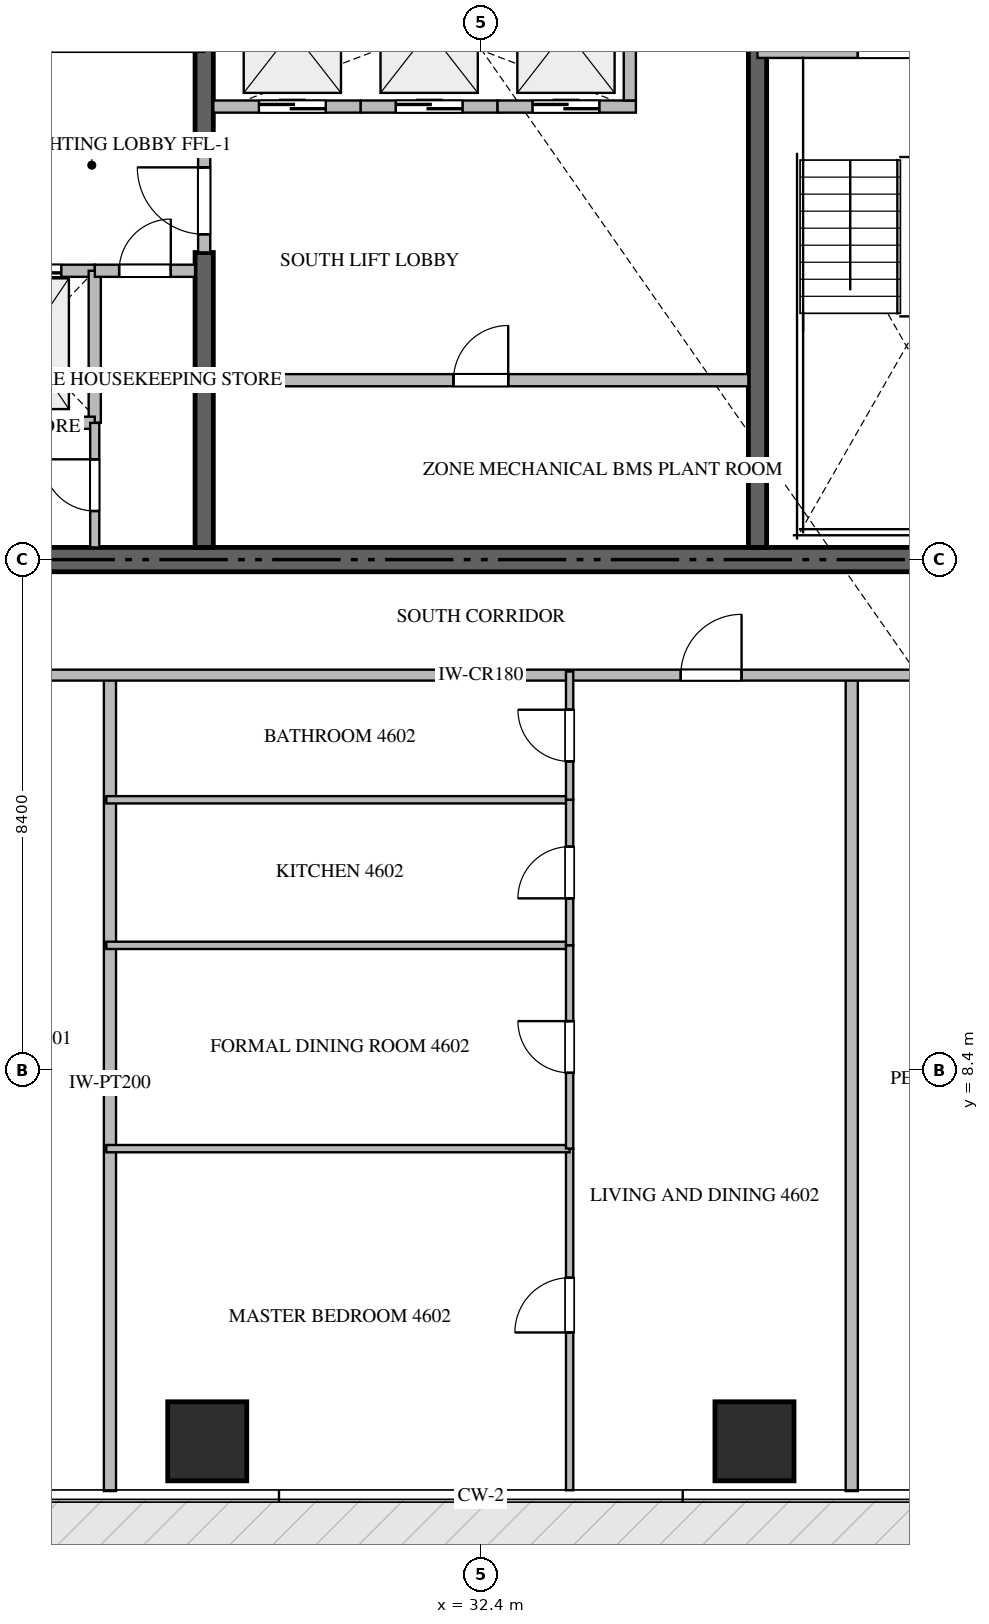
"""IFC4 building model, lengths in metres.
Left out: names, types, materials, properties, quantities, classifications, styles, units other than length and angle.
Written with IfcOpenShell. Run it as: python <this file> out.ifc"""

import sys

from ifc_helpers import new_model, si_unit, direction, frame, frame_2d, origin, origin_2d, place, context, subcontext, project, spatial, rectangle, extrude, source, transform, mapped, element, fill, save


model = new_model("IFC4")
c1 = context("Model", 3, precision=1e-05, world=origin(), true_north=direction((0.0, 1.0)))
c2 = subcontext(c1, "Body", "Model", "MODEL_VIEW")
j1 = project(units=[si_unit("LENGTHUNIT", "METRE"), si_unit("PLANEANGLEUNIT", "RADIAN")], contexts=[c1])
p1 = place(None, origin())
s1 = spatial("IfcSite", under=j1, at=p1, CompositionType="ELEMENT")
p2 = place(p1, origin())
s2 = spatial("IfcBuilding", under=s1, at=p2, CompositionType="ELEMENT")
p3 = place(p2, frame((0.0, 0.0, 183.9)))
s3 = spatial("IfcBuildingStorey", under=s2, at=p3, CompositionType="ELEMENT", Elevation=183.9)
p4 = place(p3, frame((23.4, 16.8, -0.26), z_axis=(0.0, 0.0, 1.0), x_axis=(1.0, 0.0, 0.0)))
e1 = element("IfcWall", 1, at=p4, inside=s3, PredefinedType="SHEAR", context=c2, shape_type="SweptSolid", body=[
    extrude(rectangle(XDim=18.0, YDim=0.4, at=frame_2d((9.0, 0.0))), origin(), (0.0, 0.0, 1.0), 3.748),
])
p5 = place(p3, frame((27.85, 17.0, -0.26), z_axis=(0.0, 0.0, 1.0), x_axis=(0.0, 1.0, 0.0)))
e2 = element("IfcWall", 2, at=p5, inside=s3, PredefinedType="SHEAR", context=c2, shape_type="SweptSolid", body=[
    extrude(rectangle(XDim=4.85, YDim=0.3, at=frame_2d((2.425, 0.0))), origin(), (0.0, 0.0, 1.0), 3.748),
])
p6 = place(p3, frame((27.85, 23.55, -0.26), z_axis=(0.0, 0.0, 1.0), x_axis=(0.0, 1.0, 0.0)))
e3 = element("IfcWall", 3, at=p6, inside=s3, PredefinedType="SHEAR", context=c2, shape_type="SweptSolid", body=[
    extrude(rectangle(XDim=9.85, YDim=0.3, at=frame_2d((4.925, 0.0))), origin(), (0.0, 0.0, 1.0), 3.748),
])
p7 = place(p3, frame((36.95, 17.0, -0.26), z_axis=(0.0, 0.0, 1.0), x_axis=(0.0, 1.0, 0.0)))
e4 = element("IfcWall", 4, at=p7, inside=s3, PredefinedType="SHEAR", context=c2, shape_type="SweptSolid", body=[
    extrude(rectangle(XDim=8.35, YDim=0.3, at=frame_2d((4.175, 0.0))), origin(), (0.0, 0.0, 1.0), 3.748),
])
m1 = source(origin(), c2, "Body", "SweptSolid", [
    extrude(rectangle(XDim=1.3, YDim=1.3, at=origin_2d()), origin(), (0.0, 0.0, 1.0), 3.75),
])
for number, where, z_axis, x_axis in (
    (5, (27.9, 2.3, -0.26), (0.0, 0.0, 1.0), (1.0, 0.0, 0.0)),
    (6, (36.9, 2.3, -0.26), (0.0, 0.0, 1.0), (1.0, 0.0, 0.0)),
):
    element("IfcColumn", number, at=place(p3, frame(where, z_axis=z_axis, x_axis=x_axis)), inside=s3, PredefinedType="COLUMN", context=c2, shape_type="MappedRepresentation", body=[
        mapped(m1, transform((0.0, 0.0, 0.0), scale=1.0)),
    ])
p8 = place(p3, frame((36.95, 25.15, 0.0), z_axis=(0.0, 0.0, 1.0), x_axis=(1.0, 0.0, 0.0)))
e7 = element("IfcWall", 7, at=p8, inside=s3, PredefinedType="STANDARD", context=c2, shape_type="SweptSolid", body=[
    extrude(rectangle(XDim=4.45, YDim=0.2, at=frame_2d((2.225, 0.0))), origin(), (0.0, 0.0, 1.0), 3.49),
])
p9 = place(p8, frame((1.65, 0.0, 0.0)))
e8 = element("IfcOpeningElement", 8, at=p9, cuts=e7, PredefinedType="OPENING", context=c2, shape_type="SweptSolid", body=[
    extrude(rectangle(XDim=1.1, YDim=2.15, at=frame_2d((0.55, 1.075))), frame((0.0, 0.11, 0.0), z_axis=(0.0, -1.0, 0.0), x_axis=(1.0, 0.0, 0.0)), (0.0, 0.0, 1.0), 0.22),
])
p10 = place(p3, frame((23.6, 21.55, 0.0), z_axis=(0.0, 0.0, 1.0), x_axis=(1.0, 0.0, 0.0)))
e9 = element("IfcWall", 9, at=p10, inside=s3, PredefinedType="STANDARD", context=c2, shape_type="SweptSolid", body=[
    extrude(rectangle(XDim=2.45, YDim=0.2, at=frame_2d((1.225, 0.0))), origin(), (0.0, 0.0, 1.0), 3.49),
])
p11 = place(p10, frame((0.7, 0.0, 0.0)))
e10 = element("IfcOpeningElement", 10, at=p11, cuts=e9, PredefinedType="OPENING", context=c2, shape_type="SweptSolid", body=[
    extrude(rectangle(XDim=1.2, YDim=2.2, at=frame_2d((0.6, 1.1))), frame((0.0, 0.11, 0.0), z_axis=(0.0, -1.0, 0.0), x_axis=(1.0, 0.0, 0.0)), (0.0, 0.0, 1.0), 0.22),
])
p12 = place(p3, frame((28.0, 24.25, 0.0), z_axis=(0.0, 0.0, 1.0), x_axis=(1.0, 0.0, 0.0)))
e11 = element("IfcWall", 11, at=p12, inside=s3, PredefinedType="STANDARD", context=c2, shape_type="SweptSolid", body=[
    extrude(rectangle(XDim=2.425, YDim=0.2, at=frame_2d((1.212, 0.0))), origin(), (0.0, 0.0, 1.0), 3.49),
])
p13 = place(p12, frame((0.75, 0.0, 0.0)))
e12 = element("IfcOpeningElement", 12, at=p13, cuts=e11, PredefinedType="OPENING", context=c2, shape_type="SweptSolid", body=[
    extrude(rectangle(XDim=1.1, YDim=2.2, at=frame_2d((0.55, 1.1))), frame((0.0, 0.11, 0.0), z_axis=(0.0, -1.0, 0.0), x_axis=(1.0, 0.0, 0.0)), (0.0, 0.0, 1.0), 0.22),
])
p14 = place(p3, frame((30.425, 24.25, 0.0), z_axis=(0.0, 0.0, 1.0), x_axis=(1.0, 0.0, 0.0)))
e13 = element("IfcWall", 13, at=p14, inside=s3, PredefinedType="STANDARD", context=c2, shape_type="SweptSolid", body=[
    extrude(rectangle(XDim=2.25, YDim=0.2, at=frame_2d((1.125, 0.0))), origin(), (0.0, 0.0, 1.0), 3.49),
])
p15 = place(p14, frame((0.575, 0.0, 0.0)))
e14 = element("IfcOpeningElement", 14, at=p15, cuts=e13, PredefinedType="OPENING", context=c2, shape_type="SweptSolid", body=[
    extrude(rectangle(XDim=1.1, YDim=2.2, at=frame_2d((0.55, 1.1))), frame((0.0, 0.11, 0.0), z_axis=(0.0, -1.0, 0.0), x_axis=(1.0, 0.0, 0.0)), (0.0, 0.0, 1.0), 0.22),
])
p16 = place(p3, frame((32.675, 24.25, 0.0), z_axis=(0.0, 0.0, 1.0), x_axis=(1.0, 0.0, 0.0)))
e15 = element("IfcWall", 15, at=p16, inside=s3, PredefinedType="STANDARD", context=c2, shape_type="SweptSolid", body=[
    extrude(rectangle(XDim=2.275, YDim=0.2, at=frame_2d((1.137, 0.0))), origin(), (0.0, 0.0, 1.0), 3.49),
])
p17 = place(p16, frame((0.575, 0.0, 0.0)))
e16 = element("IfcOpeningElement", 16, at=p17, cuts=e15, PredefinedType="OPENING", context=c2, shape_type="SweptSolid", body=[
    extrude(rectangle(XDim=1.1, YDim=2.2, at=frame_2d((0.55, 1.1))), frame((0.0, 0.11, 0.0), z_axis=(0.0, -1.0, 0.0), x_axis=(1.0, 0.0, 0.0)), (0.0, 0.0, 1.0), 0.22),
])
for number, where, z_axis, x_axis in (
    (17, (34.85, 24.35, 0.0), (0.0, 0.0, 1.0), (0.0, 1.0, 0.0)),
    (18, (26.05, 19.05, 0.0), (0.0, 0.0, 1.0), (0.0, 1.0, 0.0)),
):
    element("IfcWall", number, at=place(p3, frame(where, z_axis=z_axis, x_axis=x_axis)), inside=s3, PredefinedType="STANDARD", context=c2, shape_type="SweptSolid", body=[
        extrude(rectangle(XDim=2.5, YDim=0.2, at=frame_2d((1.25, 0.0))), origin(), (0.0, 0.0, 1.0), 3.49),
    ])
p18 = place(p3, frame((23.6, 19.05, 0.0), z_axis=(0.0, 0.0, 1.0), x_axis=(1.0, 0.0, 0.0)))
e19 = element("IfcWall", 19, at=p18, inside=s3, PredefinedType="STANDARD", context=c2, shape_type="SweptSolid", body=[
    extrude(rectangle(XDim=2.45, YDim=0.2, at=frame_2d((1.225, 0.0))), origin(), (0.0, 0.0, 1.0), 3.49),
])
p19 = place(p3, frame((26.052, 21.55, 0.0), z_axis=(0.0, 0.0, 1.0), x_axis=(1.0, 0.0, 0.0)))
e20 = element("IfcWall", 20, at=p19, inside=s3, PredefinedType="STANDARD", context=c2, shape_type="SweptSolid", body=[
    extrude(rectangle(XDim=1.648, YDim=0.2, at=frame_2d((0.824, 0.0))), origin(), (0.0, 0.0, 1.0), 3.49),
])
p20 = place(p19, frame((0.399, 0.0, 0.0)))
e21 = element("IfcOpeningElement", 21, at=p20, cuts=e20, PredefinedType="OPENING", context=c2, shape_type="SweptSolid", body=[
    extrude(rectangle(XDim=0.85, YDim=2.1, at=frame_2d((0.425, 1.05))), frame((0.0, 0.11, 0.0), z_axis=(0.0, -1.0, 0.0), x_axis=(1.0, 0.0, 0.0)), (0.0, 0.0, 1.0), 0.22),
])
p21 = place(p3, frame((27.85, 21.852, 0.0), z_axis=(0.0, 0.0, 1.0), x_axis=(0.0, 1.0, 0.0)))
e22 = element("IfcWall", 22, at=p21, inside=s3, PredefinedType="STANDARD", context=c2, shape_type="SweptSolid", body=[
    extrude(rectangle(XDim=1.696, YDim=0.2, at=frame_2d((0.848, 0.0))), origin(), (0.0, 0.0, 1.0), 3.49),
])
p22 = place(p21, frame((0.298, 0.0, 0.0)))
e23 = element("IfcOpeningElement", 23, at=p22, cuts=e22, PredefinedType="OPENING", context=c2, shape_type="SweptSolid", body=[
    extrude(rectangle(XDim=1.1, YDim=2.15, at=frame_2d((0.55, 1.075))), frame((0.0, 0.11, 0.0), z_axis=(0.0, -1.0, 0.0), x_axis=(1.0, 0.0, 0.0)), (0.0, 0.0, 1.0), 0.22),
])
p23 = place(p3, frame((26.05, 17.0, 0.0), z_axis=(0.0, 0.0, 1.0), x_axis=(0.0, 1.0, 0.0)))
e24 = element("IfcWall", 24, at=p23, inside=s3, PredefinedType="PARTITIONING", context=c2, shape_type="SweptSolid", body=[
    extrude(rectangle(XDim=2.048, YDim=0.15, at=frame_2d((1.024, 0.0))), origin(), (0.0, 0.0, 1.0), 3.49),
])
p24 = place(p23, frame((0.599, 0.0, 0.0)))
e25 = element("IfcOpeningElement", 25, at=p24, cuts=e24, PredefinedType="OPENING", context=c2, shape_type="SweptSolid", body=[
    extrude(rectangle(XDim=0.85, YDim=2.1, at=frame_2d((0.425, 1.05))), frame((0.0, 0.085, 0.0), z_axis=(0.0, -1.0, 0.0), x_axis=(1.0, 0.0, 0.0)), (0.0, 0.0, 1.0), 0.17),
])
p25 = place(p3, frame((28.0, 19.75, 0.0), z_axis=(0.0, 0.0, 1.0), x_axis=(1.0, 0.0, 0.0)))
e26 = element("IfcWall", 26, at=p25, inside=s3, PredefinedType="STANDARD", context=c2, shape_type="SweptSolid", body=[
    extrude(rectangle(XDim=8.8, YDim=0.2, at=frame_2d((4.4, 0.0))), origin(), (0.0, 0.0, 1.0), 3.49),
])
p26 = place(p25, frame((3.95, 0.0, 0.0)))
e27 = element("IfcOpeningElement", 27, at=p26, cuts=e26, PredefinedType="OPENING", context=c2, shape_type="SweptSolid", body=[
    extrude(rectangle(XDim=0.9, YDim=2.1, at=frame_2d((0.45, 1.05))), frame((0.0, 0.11, 0.0), z_axis=(0.0, -1.0, 0.0), x_axis=(1.0, 0.0, 0.0)), (0.0, 0.0, 1.0), 0.22),
])
for number, where, z_axis, x_axis in (
    (28, (26.3, 1.482, 0.0), (0.0, 0.0, 1.0), (0.0, 1.0, 0.0)),
    (29, (38.5, 1.482, 0.0), (0.0, 0.0, 1.0), (0.0, 1.0, 0.0)),
):
    element("IfcWall", number, at=place(p3, frame(where, z_axis=z_axis, x_axis=x_axis)), inside=s3, PredefinedType="PARTITIONING", context=c2, shape_type="SweptSolid", body=[
        extrude(rectangle(XDim=13.418, YDim=0.2, at=frame_2d((6.709, 0.0))), origin(), (0.0, 0.0, 1.0), 3.49),
    ])
p27 = place(p3, frame((20.952, 14.9, 0.0), z_axis=(0.0, 0.0, 1.0), x_axis=(1.0, 0.0, 0.0)))
e30 = element("IfcWall", 30, at=p27, inside=s3, PredefinedType="PARTITIONING", context=c2, shape_type="SweptSolid", body=[
    extrude(rectangle(XDim=22.896, YDim=0.18, at=frame_2d((11.448, 0.0))), origin(), (0.0, 0.0, 1.0), 3.49),
])
p28 = place(p27, frame((2.781, 0.0, 0.0)))
e31 = element("IfcOpeningElement", 31, at=p28, cuts=e30, PredefinedType="OPENING", context=c2, shape_type="SweptSolid", body=[
    extrude(rectangle(XDim=1.0, YDim=2.15, at=frame_2d((0.5, 1.075))), frame((0.0, 0.1, 0.0), z_axis=(0.0, -1.0, 0.0), x_axis=(1.0, 0.0, 0.0)), (0.0, 0.0, 1.0), 0.2),
])
p29 = place(p27, frame((14.736, 0.0, 0.0)))
e32 = element("IfcOpeningElement", 32, at=p29, cuts=e30, PredefinedType="OPENING", context=c2, shape_type="SweptSolid", body=[
    extrude(rectangle(XDim=1.0, YDim=2.15, at=frame_2d((0.5, 1.075))), frame((0.0, 0.1, 0.0), z_axis=(0.0, -1.0, 0.0), x_axis=(1.0, 0.0, 0.0)), (0.0, 0.0, 1.0), 0.2),
])
p30 = place(p27, frame((19.115, 0.0, 0.0)))
e33 = element("IfcOpeningElement", 33, at=p30, cuts=e30, PredefinedType="OPENING", context=c2, shape_type="SweptSolid", body=[
    extrude(rectangle(XDim=1.0, YDim=2.15, at=frame_2d((0.5, 1.075))), frame((0.0, 0.1, 0.0), z_axis=(0.0, -1.0, 0.0), x_axis=(1.0, 0.0, 0.0)), (0.0, 0.0, 1.0), 0.2),
])
p31 = place(p3, frame((33.86, 1.495, 0.0), z_axis=(0.0, 0.0, 1.0), x_axis=(0.0, 1.0, 0.0)))
e34 = element("IfcWall", 34, at=p31, inside=s3, PredefinedType="PARTITIONING", context=c2, shape_type="SweptSolid", body=[
    extrude(rectangle(XDim=5.618, YDim=0.12, at=frame_2d((2.809, 0.0))), origin(), (0.0, 0.0, 1.0), 3.49),
])
p32 = place(p31, frame((2.595, 0.0, 0.0)))
e35 = element("IfcOpeningElement", 35, at=p32, cuts=e34, PredefinedType="OPENING", context=c2, shape_type="SweptSolid", body=[
    extrude(rectangle(XDim=0.9, YDim=2.1, at=frame_2d((0.45, 1.05))), frame((0.0, 0.07, 0.0), z_axis=(0.0, -1.0, 0.0), x_axis=(1.0, 0.0, 0.0)), (0.0, 0.0, 1.0), 0.14),
])
p33 = place(p3, frame((26.24, 7.113, 0.0), z_axis=(0.0, 0.0, 1.0), x_axis=(1.0, 0.0, 0.0)))
e36 = element("IfcWall", 36, at=p33, inside=s3, PredefinedType="PARTITIONING", context=c2, shape_type="SweptSolid", body=[
    extrude(rectangle(XDim=7.62, YDim=0.12, at=frame_2d((3.81, 0.0))), origin(), (0.0, 0.0, 1.0), 3.49),
])
p34 = place(p3, frame((26.24, 10.456, 0.0), z_axis=(0.0, 0.0, 1.0), x_axis=(1.0, 0.0, 0.0)))
e37 = element("IfcWall", 37, at=p34, inside=s3, PredefinedType="PARTITIONING", context=c2, shape_type="SweptSolid", body=[
    extrude(rectangle(XDim=7.62, YDim=0.12, at=frame_2d((3.81, 0.0))), origin(), (0.0, 0.0, 1.0), 2.972),
])
p35 = place(p3, frame((26.24, 12.85, 0.0), z_axis=(0.0, 0.0, 1.0), x_axis=(1.0, 0.0, 0.0)))
e38 = element("IfcWall", 38, at=p35, inside=s3, PredefinedType="PARTITIONING", context=c2, shape_type="SweptSolid", body=[
    extrude(rectangle(XDim=7.62, YDim=0.12, at=frame_2d((3.81, 0.0))), origin(), (0.0, 0.0, 1.0), 3.49),
])
p36 = place(p3, frame((33.86, 7.115, 0.0), z_axis=(0.0, 0.0, 1.0), x_axis=(0.0, 1.0, 0.0)))
e39 = element("IfcWall", 39, at=p36, inside=s3, PredefinedType="PARTITIONING", context=c2, shape_type="SweptSolid", body=[
    extrude(rectangle(XDim=3.341, YDim=0.12, at=frame_2d((1.67, 0.0))), origin(), (0.0, 0.0, 1.0), 3.49),
])
p37 = place(p36, frame((1.245, 0.0, 0.0)))
e40 = element("IfcOpeningElement", 40, at=p37, cuts=e39, PredefinedType="OPENING", context=c2, shape_type="SweptSolid", body=[
    extrude(rectangle(XDim=0.85, YDim=2.1, at=frame_2d((0.425, 1.05))), frame((0.0, 0.07, 0.0), z_axis=(0.0, -1.0, 0.0), x_axis=(1.0, 0.0, 0.0)), (0.0, 0.0, 1.0), 0.14),
])
p38 = place(p3, frame((33.86, 10.458, 0.0), z_axis=(0.0, 0.0, 1.0), x_axis=(0.0, 1.0, 0.0)))
e41 = element("IfcWall", 41, at=p38, inside=s3, PredefinedType="PARTITIONING", context=c2, shape_type="SweptSolid", body=[
    extrude(rectangle(XDim=2.392, YDim=0.12, at=frame_2d((1.196, 0.0))), origin(), (0.0, 0.0, 1.0), 3.49),
])
p39 = place(p38, frame((0.771, 0.0, 0.0)))
e42 = element("IfcOpeningElement", 42, at=p39, cuts=e41, PredefinedType="OPENING", context=c2, shape_type="SweptSolid", body=[
    extrude(rectangle(XDim=0.85, YDim=2.1, at=frame_2d((0.425, 1.05))), frame((0.0, 0.07, 0.0), z_axis=(0.0, -1.0, 0.0), x_axis=(1.0, 0.0, 0.0)), (0.0, 0.0, 1.0), 0.14),
])
p40 = place(p3, frame((33.86, 12.852, 0.0), z_axis=(0.0, 0.0, 1.0), x_axis=(0.0, 1.0, 0.0)))
e43 = element("IfcWall", 43, at=p40, inside=s3, PredefinedType="PARTITIONING", context=c2, shape_type="SweptSolid", body=[
    extrude(rectangle(XDim=2.108, YDim=0.12, at=frame_2d((1.054, 0.0))), origin(), (0.0, 0.0, 1.0), 3.49),
])
p41 = place(p40, frame((0.629, 0.0, 0.0)))
e44 = element("IfcOpeningElement", 44, at=p41, cuts=e43, PredefinedType="OPENING", context=c2, shape_type="SweptSolid", body=[
    extrude(rectangle(XDim=0.85, YDim=2.1, at=frame_2d((0.425, 1.05))), frame((0.0, 0.07, 0.0), z_axis=(0.0, -1.0, 0.0), x_axis=(1.0, 0.0, 0.0)), (0.0, 0.0, 1.0), 0.14),
])
m2 = source(origin(), c2, "Body", "SweptSolid", [
    extrude(rectangle(XDim=1.1, YDim=2.15, at=frame_2d((0.55, 1.075))), frame((0.0, 0.025, 0.0), z_axis=(0.0, -1.0, 0.0), x_axis=(1.0, 0.0, 0.0)), (0.0, 0.0, 1.0), 0.05),
])
p42 = place(p9, origin())
e45 = element("IfcDoor", 45, at=p42, inside=s3, OperationType="SINGLE_SWING_LEFT", PredefinedType="DOOR", context=c2, shape_type="MappedRepresentation", body=[
    mapped(m2, transform((0.0, 0.0, 0.0), scale=1.0)),
])
fill(e8, e45)
m3 = source(origin(), c2, "Body", "SweptSolid", [
    extrude(rectangle(XDim=1.2, YDim=2.2, at=frame_2d((0.6, 1.1))), frame((0.0, 0.025, 0.0), z_axis=(0.0, -1.0, 0.0), x_axis=(1.0, 0.0, 0.0)), (0.0, 0.0, 1.0), 0.05),
])
p43 = place(p11, origin())
e46 = element("IfcDoor", 46, at=p43, inside=s3, OperationType="DOUBLE_DOOR_SLIDING", PredefinedType="DOOR", context=c2, shape_type="MappedRepresentation", body=[
    mapped(m3, transform((0.0, 0.0, 0.0), scale=1.0)),
])
fill(e10, e46)
m4 = source(origin(), c2, "Body", "SweptSolid", [
    extrude(rectangle(XDim=1.1, YDim=2.2, at=frame_2d((0.55, 1.1))), frame((0.0, 0.025, 0.0), z_axis=(0.0, -1.0, 0.0), x_axis=(1.0, 0.0, 0.0)), (0.0, 0.0, 1.0), 0.05),
])
p44 = place(p13, origin())
e47 = element("IfcDoor", 47, at=p44, inside=s3, OperationType="DOUBLE_DOOR_SLIDING", PredefinedType="DOOR", context=c2, shape_type="MappedRepresentation", body=[
    mapped(m4, transform((0.0, 0.0, 0.0), scale=1.0)),
])
fill(e12, e47)
p45 = place(p15, origin())
e48 = element("IfcDoor", 48, at=p45, inside=s3, OperationType="DOUBLE_DOOR_SLIDING", PredefinedType="DOOR", context=c2, shape_type="MappedRepresentation", body=[
    mapped(m4, transform((0.0, 0.0, 0.0), scale=1.0)),
])
fill(e14, e48)
p46 = place(p17, origin())
e49 = element("IfcDoor", 49, at=p46, inside=s3, OperationType="DOUBLE_DOOR_SLIDING", PredefinedType="DOOR", context=c2, shape_type="MappedRepresentation", body=[
    mapped(m4, transform((0.0, 0.0, 0.0), scale=1.0)),
])
fill(e16, e49)
m5 = source(origin(), c2, "Body", "SweptSolid", [
    extrude(rectangle(XDim=0.85, YDim=2.1, at=frame_2d((0.425, 1.05))), frame((0.0, 0.025, 0.0), z_axis=(0.0, -1.0, 0.0), x_axis=(1.0, 0.0, 0.0)), (0.0, 0.0, 1.0), 0.05),
])
p47 = place(p20, origin())
e50 = element("IfcDoor", 50, at=p47, inside=s3, OperationType="SINGLE_SWING_RIGHT", PredefinedType="DOOR", context=c2, shape_type="MappedRepresentation", body=[
    mapped(m5, transform((0.0, 0.0, 0.0), scale=1.0)),
])
fill(e21, e50)
p48 = place(p22, origin())
e51 = element("IfcDoor", 51, at=p48, inside=s3, OperationType="SINGLE_SWING_RIGHT", PredefinedType="DOOR", context=c2, shape_type="MappedRepresentation", body=[
    mapped(m2, transform((0.0, 0.0, 0.0), scale=1.0)),
])
fill(e23, e51)
p49 = place(p24, origin())
e52 = element("IfcDoor", 52, at=p49, inside=s3, OperationType="SINGLE_SWING_RIGHT", PredefinedType="DOOR", context=c2, shape_type="MappedRepresentation", body=[
    mapped(m5, transform((0.0, 0.0, 0.0), scale=1.0)),
])
fill(e25, e52)
m6 = source(origin(), c2, "Body", "SweptSolid", [
    extrude(rectangle(XDim=0.9, YDim=2.1, at=frame_2d((0.45, 1.05))), frame((0.0, 0.025, 0.0), z_axis=(0.0, -1.0, 0.0), x_axis=(1.0, 0.0, 0.0)), (0.0, 0.0, 1.0), 0.05),
])
p50 = place(p26, origin())
e53 = element("IfcDoor", 53, at=p50, inside=s3, OperationType="SINGLE_SWING_RIGHT", PredefinedType="DOOR", context=c2, shape_type="MappedRepresentation", body=[
    mapped(m6, transform((0.0, 0.0, 0.0), scale=1.0)),
])
fill(e27, e53)
m7 = source(origin(), c2, "Body", "SweptSolid", [
    extrude(rectangle(XDim=1.0, YDim=2.15, at=frame_2d((0.5, 1.075))), frame((0.0, 0.025, 0.0), z_axis=(0.0, -1.0, 0.0), x_axis=(1.0, 0.0, 0.0)), (0.0, 0.0, 1.0), 0.05),
])
p51 = place(p29, origin())
e54 = element("IfcDoor", 54, at=p51, inside=s3, OperationType="SINGLE_SWING_RIGHT", PredefinedType="DOOR", context=c2, shape_type="MappedRepresentation", body=[
    mapped(m7, transform((0.0, 0.0, 0.0), scale=1.0)),
])
fill(e32, e54)
p52 = place(p32, origin())
e55 = element("IfcDoor", 55, at=p52, inside=s3, OperationType="SINGLE_SWING_LEFT", PredefinedType="DOOR", context=c2, shape_type="MappedRepresentation", body=[
    mapped(m6, transform((0.0, 0.0, 0.0), scale=1.0)),
])
fill(e35, e55)
p53 = place(p37, origin())
e56 = element("IfcDoor", 56, at=p53, inside=s3, OperationType="SINGLE_SWING_RIGHT", PredefinedType="DOOR", context=c2, shape_type="MappedRepresentation", body=[
    mapped(m5, transform((0.0, 0.0, 0.0), scale=1.0)),
])
fill(e40, e56)
p54 = place(p39, origin())
e57 = element("IfcDoor", 57, at=p54, inside=s3, OperationType="SINGLE_SWING_LEFT", PredefinedType="DOOR", context=c2, shape_type="MappedRepresentation", body=[
    mapped(m5, transform((0.0, 0.0, 0.0), scale=1.0)),
])
fill(e42, e57)
p55 = place(p41, origin())
e58 = element("IfcDoor", 58, at=p55, inside=s3, OperationType="SINGLE_SWING_RIGHT", PredefinedType="DOOR", context=c2, shape_type="MappedRepresentation", body=[
    mapped(m5, transform((0.0, 0.0, 0.0), scale=1.0)),
])
fill(e44, e58)
save(model, sys.argv[1])
